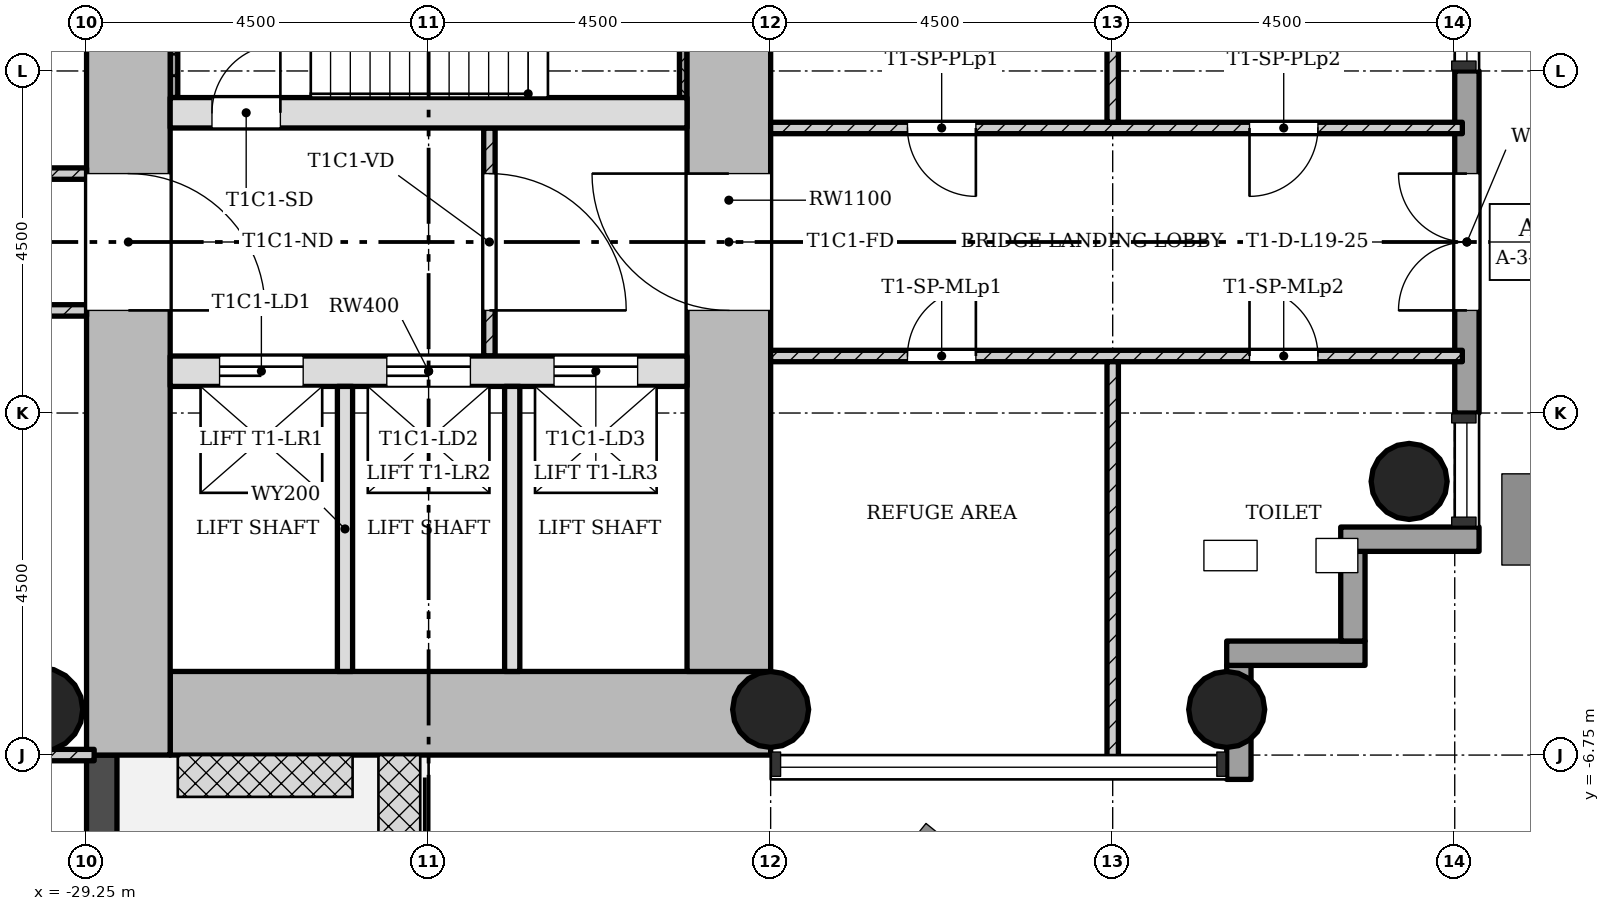
"""IFC4 building model, lengths in metres.
Left out: names, types, materials, properties, quantities, classifications, styles, units other than length and angle.
Written with IfcOpenShell. Run it as: python <this file> out.ifc"""

import sys

from ifc_helpers import new_model, si_unit, direction, frame, frame_2d, origin, origin_2d, place, context, subcontext, project, spatial, rectangle, hollow_circle, extrude, element, fill, save


model = new_model("IFC4")
c1 = context("Model", 3, precision=1e-05, world=origin(), true_north=direction((0.0, 1.0)))
c2 = subcontext(c1, "Body", "Model", "MODEL_VIEW")
j1 = project(units=[si_unit("LENGTHUNIT", "METRE"), si_unit("PLANEANGLEUNIT", "RADIAN")], contexts=[c1])
p1 = place(None, origin())
s1 = spatial("IfcSite", under=j1, at=p1, CompositionType="ELEMENT")
p2 = place(p1, origin())
s2 = spatial("IfcBuilding", under=s1, at=p2, CompositionType="ELEMENT")
p3 = place(p2, frame((0.0, 0.0, 72.1)))
s3 = spatial("IfcBuildingStorey", under=s2, at=p3, CompositionType="ELEMENT", Elevation=72.1)
p4 = place(p3, frame((-28.15, -6.2, 0.0), z_axis=(0.0, 0.0, 1.0), x_axis=(1.0, 0.0, 0.0)))
e1 = element("IfcWall", 1, at=p4, inside=s3, PredefinedType="SHEAR", context=c2, shape_type="SweptSolid", body=[
    extrude(rectangle(XDim=7.9, YDim=1.1, at=frame_2d((3.95, 0.0))), origin(), (0.0, 0.0, 1.0), 4.5),
])
p5 = place(p3, frame((-20.8, -5.65, 0.0), z_axis=(0.0, 0.0, 1.0), x_axis=(0.0, 1.0, 0.0)))
e2 = element("IfcWall", 2, at=p5, inside=s3, PredefinedType="SHEAR", context=c2, shape_type="SweptSolid", body=[
    extrude(rectangle(XDim=12.4, YDim=1.1, at=frame_2d((6.2, 0.0))), origin(), (0.0, 0.0, 1.0), 4.5),
])
p6 = place(p5, frame((4.75, 0.0, 0.0)))
e3 = element("IfcOpeningElement", 3, at=p6, cuts=e2, PredefinedType="OPENING", context=c2, shape_type="SweptSolid", body=[
    extrude(rectangle(XDim=1.8, YDim=2.1, at=frame_2d((0.9, 1.05))), frame((0.0, 0.56, 0.0), z_axis=(0.0, -1.0, 0.0), x_axis=(1.0, 0.0, 0.0)), (0.0, 0.0, 1.0), 1.12),
])
p7 = place(p3, frame((-28.7, 5.65, 0.0), z_axis=(0.0, 0.0, 1.0), x_axis=(0.0, -1.0, 0.0)))
e4 = element("IfcWall", 4, at=p7, inside=s3, PredefinedType="SHEAR", context=c2, shape_type="SweptSolid", body=[
    extrude(rectangle(XDim=12.4, YDim=1.1, at=frame_2d((6.2, 0.0))), origin(), (0.0, 0.0, 1.0), 4.5),
])
p8 = place(p7, frame((4.75, 0.0, 0.0)))
e5 = element("IfcOpeningElement", 5, at=p8, cuts=e4, PredefinedType="OPENING", context=c2, shape_type="SweptSolid", body=[
    extrude(rectangle(XDim=1.8, YDim=2.1, at=frame_2d((0.9, 1.05))), frame((0.0, 0.56, 0.0), z_axis=(0.0, -1.0, 0.0), x_axis=(1.0, 0.0, 0.0)), (0.0, 0.0, 1.0), 1.12),
])
p9 = place(p3, frame((-28.15, -1.7, 0.0), z_axis=(0.0, 0.0, 1.0), x_axis=(1.0, 0.0, 0.0)))
e6 = element("IfcWall", 6, at=p9, inside=s3, PredefinedType="SHEAR", context=c2, shape_type="SweptSolid", body=[
    extrude(rectangle(XDim=6.8, YDim=0.4, at=frame_2d((3.4, 0.0))), origin(), (0.0, 0.0, 1.0), 4.5),
])
p10 = place(p9, frame((0.65, 0.0, 0.0)))
e7 = element("IfcOpeningElement", 7, at=p10, cuts=e6, PredefinedType="OPENING", context=c2, shape_type="SweptSolid", body=[
    extrude(rectangle(XDim=1.1, YDim=2.1, at=frame_2d((0.55, 1.05))), frame((0.0, 0.21, 0.0), z_axis=(0.0, -1.0, 0.0), x_axis=(1.0, 0.0, 0.0)), (0.0, 0.0, 1.0), 0.42),
])
p11 = place(p9, frame((2.85, 0.0, 0.0)))
e8 = element("IfcOpeningElement", 8, at=p11, cuts=e6, PredefinedType="OPENING", context=c2, shape_type="SweptSolid", body=[
    extrude(rectangle(XDim=1.1, YDim=2.1, at=frame_2d((0.55, 1.05))), frame((0.0, 0.21, 0.0), z_axis=(0.0, -1.0, 0.0), x_axis=(1.0, 0.0, 0.0)), (0.0, 0.0, 1.0), 0.42),
])
p12 = place(p9, frame((5.05, 0.0, 0.0)))
e9 = element("IfcOpeningElement", 9, at=p12, cuts=e6, PredefinedType="OPENING", context=c2, shape_type="SweptSolid", body=[
    extrude(rectangle(XDim=1.1, YDim=2.1, at=frame_2d((0.55, 1.05))), frame((0.0, 0.21, 0.0), z_axis=(0.0, -1.0, 0.0), x_axis=(1.0, 0.0, 0.0)), (0.0, 0.0, 1.0), 0.42),
])
p13 = place(p3, frame((-28.15, 1.7, 0.0), z_axis=(0.0, 0.0, 1.0), x_axis=(1.0, 0.0, 0.0)))
e10 = element("IfcWall", 10, at=p13, inside=s3, PredefinedType="SHEAR", context=c2, shape_type="SweptSolid", body=[
    extrude(rectangle(XDim=6.8, YDim=0.4, at=frame_2d((3.4, 0.0))), origin(), (0.0, 0.0, 1.0), 4.5),
])
p14 = place(p13, frame((0.55, 0.0, 0.0)))
e11 = element("IfcOpeningElement", 11, at=p14, cuts=e10, PredefinedType="OPENING", context=c2, shape_type="SweptSolid", body=[
    extrude(rectangle(XDim=0.9, YDim=2.1, at=frame_2d((0.45, 1.05))), frame((0.0, 0.21, 0.0), z_axis=(0.0, -1.0, 0.0), x_axis=(1.0, 0.0, 0.0)), (0.0, 0.0, 1.0), 0.42),
])
for number, where, z_axis, x_axis in (
    (12, (-20.25, -6.15, 0.0), (0.0, 0.0, 1.0), (1.0, 0.0, 0.0)),
    (13, (-14.25, -6.15, 0.0), (0.0, 0.0, 1.0), (1.0, 0.0, 0.0)),
    (14, (-11.85, -3.15, 0.0), (0.0, 0.0, 1.0), (1.0, 0.0, 0.0)),
):
    element("IfcColumn", number, at=place(p3, frame(where, z_axis=z_axis, x_axis=x_axis)), inside=s3, PredefinedType="COLUMN", context=c2, shape_type="SweptSolid", body=[
        extrude(hollow_circle(Radius=0.5, WallThickness=0.036, at=origin_2d()), origin(), (0.0, 0.0, 1.0), 4.5),
    ])
p15 = place(p3, frame((-29.85, -6.15, 0.0), z_axis=(0.0, 0.0, 1.0), x_axis=(1.0, 0.0, 0.0)))
e15 = element("IfcColumn", 15, at=p15, inside=s3, PredefinedType="COLUMN", context=c2, shape_type="SweptSolid", body=[
    extrude(hollow_circle(Radius=0.55, WallThickness=0.04, at=origin_2d()), origin(), (0.0, 0.0, 1.0), 4.5),
])
p16 = place(p3, frame((-29.05, -11.25, -0.02), z_axis=(0.0, 0.0, 1.0), x_axis=(0.0, 1.0, 0.0)))
e16 = element("IfcWall", 16, at=p16, inside=s3, PredefinedType="STANDARD", context=c2, shape_type="SweptSolid", body=[
    extrude(rectangle(XDim=4.5, YDim=0.4, at=frame_2d((2.25, 0.0))), origin(), (0.0, 0.0, 1.0), 4.22),
])
p17 = place(p16, frame((1.35, 0.0, 0.02)))
e17 = element("IfcOpeningElement", 17, at=p17, cuts=e16, PredefinedType="OPENING", context=c2, shape_type="SweptSolid", body=[
    extrude(rectangle(XDim=1.8, YDim=2.1, at=frame_2d((0.9, 1.05))), frame((0.0, 0.21, 0.0), z_axis=(0.0, -1.0, 0.0), x_axis=(1.0, 0.0, 0.0)), (0.0, 0.0, 1.0), 0.42),
])
p18 = place(p3, frame((-14.09, -7.07, -0.3), z_axis=(0.0, 0.0, 1.0), x_axis=(0.0, 1.0, 0.0)))
e18 = element("IfcWall", 18, at=p18, inside=s3, PredefinedType="STANDARD", context=c2, shape_type="SweptSolid", body=[
    extrude(rectangle(XDim=1.5, YDim=0.32, at=frame_2d((0.75, 0.0))), origin(), (0.0, 0.0, 1.0), 4.5),
])
p19 = place(p3, frame((-14.25, -5.41, -0.3), z_axis=(0.0, 0.0, 1.0), x_axis=(1.0, 0.0, 0.0)))
e19 = element("IfcWall", 19, at=p19, inside=s3, PredefinedType="STANDARD", context=c2, shape_type="SweptSolid", body=[
    extrude(rectangle(XDim=1.82, YDim=0.32, at=frame_2d((0.91, 0.0))), origin(), (0.0, 0.0, 1.0), 4.5),
])
p20 = place(p3, frame((-12.59, -5.25, -0.3), z_axis=(0.0, 0.0, 1.0), x_axis=(0.0, 1.0, 0.0)))
e20 = element("IfcWall", 20, at=p20, inside=s3, PredefinedType="STANDARD", context=c2, shape_type="SweptSolid", body=[
    extrude(rectangle(XDim=1.18, YDim=0.32, at=frame_2d((0.59, 0.0))), origin(), (0.0, 0.0, 1.0), 4.5),
])
p21 = place(p3, frame((-12.75, -3.91, -0.3), z_axis=(0.0, 0.0, 1.0), x_axis=(1.0, 0.0, 0.0)))
e21 = element("IfcWall", 21, at=p21, inside=s3, PredefinedType="STANDARD", context=c2, shape_type="SweptSolid", body=[
    extrude(rectangle(XDim=1.82, YDim=0.32, at=frame_2d((0.91, 0.0))), origin(), (0.0, 0.0, 1.0), 4.5),
])
p22 = place(p3, frame((-11.09, -2.25, -0.12), z_axis=(0.0, 0.0, 1.0), x_axis=(0.0, 1.0, 0.0)))
e22 = element("IfcWall", 22, at=p22, inside=s3, PredefinedType="STANDARD", context=c2, shape_type="SweptSolid", body=[
    extrude(rectangle(XDim=4.5, YDim=0.32, at=frame_2d((2.25, 0.0))), origin(), (0.0, 0.0, 1.0), 4.32),
])
p23 = place(p22, frame((1.35, 0.0, 0.0)))
e23 = element("IfcOpeningElement", 23, at=p23, cuts=e22, PredefinedType="OPENING", context=c2, shape_type="SweptSolid", body=[
    extrude(rectangle(XDim=1.8, YDim=2.1, at=frame_2d((0.9, 1.05))), frame((0.0, 0.17, 0.0), z_axis=(0.0, -1.0, 0.0), x_axis=(1.0, 0.0, 0.0)), (0.0, 0.0, 1.0), 0.34),
])
p24 = place(p3, frame((-23.95, -1.5, 0.0), z_axis=(0.0, 0.0, 1.0), x_axis=(0.0, 1.0, 0.0)))
e24 = element("IfcWall", 24, at=p24, inside=s3, PredefinedType="PARTITIONING", context=c2, shape_type="SweptSolid", body=[
    extrude(rectangle(XDim=3.0, YDim=0.15, at=frame_2d((1.5, 0.0))), origin(), (0.0, 0.0, 1.0), 4.08),
])
p25 = place(p24, frame((0.6, 0.0, 0.0)))
e25 = element("IfcOpeningElement", 25, at=p25, cuts=e24, PredefinedType="OPENING", context=c2, shape_type="SweptSolid", body=[
    extrude(rectangle(XDim=1.8, YDim=2.1, at=frame_2d((0.9, 1.05))), frame((0.0, 0.085, 0.0), z_axis=(0.0, -1.0, 0.0), x_axis=(1.0, 0.0, 0.0)), (0.0, 0.0, 1.0), 0.17),
])
for number, where, z_axis, x_axis in (
    (26, (-25.85, -5.65, 0.0), (0.0, 0.0, 1.0), (0.0, 1.0, 0.0)),
    (27, (-23.65, -5.65, 0.0), (0.0, 0.0, 1.0), (0.0, 1.0, 0.0)),
):
    element("IfcWall", number, at=place(p3, frame(where, z_axis=z_axis, x_axis=x_axis)), inside=s3, PredefinedType="SOLIDWALL", context=c2, shape_type="SweptSolid", body=[
        extrude(rectangle(XDim=3.75, YDim=0.2, at=frame_2d((1.875, 0.0))), origin(), (0.0, 0.0, 1.0), 4.08),
    ])
p26 = place(p3, frame((-35.1, 0.9, 0.0), z_axis=(0.0, 0.0, 1.0), x_axis=(1.0, 0.0, 0.0)))
e28 = element("IfcWall", 28, at=p26, inside=s3, PredefinedType="PARTITIONING", context=c2, shape_type="SweptSolid", body=[
    extrude(rectangle(XDim=5.85, YDim=0.15, at=frame_2d((2.925, 0.0))), origin(), (0.0, 0.0, 1.0), 4.08),
])
p27 = place(p26, frame((2.475, 0.0, 0.0)))
e29 = element("IfcOpeningElement", 29, at=p27, cuts=e28, PredefinedType="OPENING", context=c2, shape_type="SweptSolid", body=[
    extrude(rectangle(XDim=0.9, YDim=2.1, at=frame_2d((0.45, 1.05))), frame((0.0, 0.085, 0.0), z_axis=(0.0, -1.0, 0.0), x_axis=(1.0, 0.0, 0.0)), (0.0, 0.0, 1.0), 0.17),
])
p28 = place(p3, frame((-35.1, -0.9, 0.0), z_axis=(0.0, 0.0, 1.0), x_axis=(1.0, 0.0, 0.0)))
e30 = element("IfcWall", 30, at=p28, inside=s3, PredefinedType="PARTITIONING", context=c2, shape_type="SweptSolid", body=[
    extrude(rectangle(XDim=5.85, YDim=0.15, at=frame_2d((2.925, 0.0))), origin(), (0.0, 0.0, 1.0), 4.08),
])
p29 = place(p28, frame((2.475, 0.0, 0.0)))
e31 = element("IfcOpeningElement", 31, at=p29, cuts=e30, PredefinedType="OPENING", context=c2, shape_type="SweptSolid", body=[
    extrude(rectangle(XDim=0.9, YDim=2.1, at=frame_2d((0.45, 1.05))), frame((0.0, 0.085, 0.0), z_axis=(0.0, -1.0, 0.0), x_axis=(1.0, 0.0, 0.0)), (0.0, 0.0, 1.0), 0.17),
])
p30 = place(p3, frame((-20.25, 1.5, 0.0), z_axis=(0.0, 0.0, 1.0), x_axis=(1.0, 0.0, 0.0)))
e32 = element("IfcWall", 32, at=p30, inside=s3, PredefinedType="PARTITIONING", context=c2, shape_type="SweptSolid", body=[
    extrude(rectangle(XDim=9.1, YDim=0.15, at=frame_2d((4.55, 0.0))), origin(), (0.0, 0.0, 1.0), 4.08),
])
p31 = place(p30, frame((1.8, 0.0, 0.0)))
e33 = element("IfcOpeningElement", 33, at=p31, cuts=e32, PredefinedType="OPENING", context=c2, shape_type="SweptSolid", body=[
    extrude(rectangle(XDim=0.9, YDim=2.1, at=frame_2d((0.45, 1.05))), frame((0.0, 0.085, 0.0), z_axis=(0.0, -1.0, 0.0), x_axis=(1.0, 0.0, 0.0)), (0.0, 0.0, 1.0), 0.17),
])
p32 = place(p30, frame((6.3, 0.0, 0.0)))
e34 = element("IfcOpeningElement", 34, at=p32, cuts=e32, PredefinedType="OPENING", context=c2, shape_type="SweptSolid", body=[
    extrude(rectangle(XDim=0.9, YDim=2.1, at=frame_2d((0.45, 1.05))), frame((0.0, 0.085, 0.0), z_axis=(0.0, -1.0, 0.0), x_axis=(1.0, 0.0, 0.0)), (0.0, 0.0, 1.0), 0.17),
])
p33 = place(p3, frame((-15.75, 1.575, 0.0), z_axis=(0.0, 0.0, 1.0), x_axis=(0.0, 1.0, 0.0)))
e35 = element("IfcWall", 35, at=p33, inside=s3, PredefinedType="PARTITIONING", context=c2, shape_type="SweptSolid", body=[
    extrude(rectangle(XDim=5.275, YDim=0.15, at=frame_2d((2.638, 0.0))), origin(), (0.0, 0.0, 1.0), 4.08),
])
p34 = place(p3, frame((-20.25, -1.5, 0.0), z_axis=(0.0, 0.0, 1.0), x_axis=(1.0, 0.0, 0.0)))
e36 = element("IfcWall", 36, at=p34, inside=s3, PredefinedType="PARTITIONING", context=c2, shape_type="SweptSolid", body=[
    extrude(rectangle(XDim=9.1, YDim=0.15, at=frame_2d((4.55, 0.0))), origin(), (0.0, 0.0, 1.0), 4.08),
])
p35 = place(p34, frame((1.8, 0.0, 0.0)))
e37 = element("IfcOpeningElement", 37, at=p35, cuts=e36, PredefinedType="OPENING", context=c2, shape_type="SweptSolid", body=[
    extrude(rectangle(XDim=0.9, YDim=2.1, at=frame_2d((0.45, 1.05))), frame((0.0, 0.085, 0.0), z_axis=(0.0, -1.0, 0.0), x_axis=(1.0, 0.0, 0.0)), (0.0, 0.0, 1.0), 0.17),
])
p36 = place(p34, frame((6.3, 0.0, 0.0)))
e38 = element("IfcOpeningElement", 38, at=p36, cuts=e36, PredefinedType="OPENING", context=c2, shape_type="SweptSolid", body=[
    extrude(rectangle(XDim=0.9, YDim=2.1, at=frame_2d((0.45, 1.05))), frame((0.0, 0.085, 0.0), z_axis=(0.0, -1.0, 0.0), x_axis=(1.0, 0.0, 0.0)), (0.0, 0.0, 1.0), 0.17),
])
p37 = place(p3, frame((-15.75, -1.575, 0.0), z_axis=(0.0, 0.0, 1.0), x_axis=(0.0, -1.0, 0.0)))
e39 = element("IfcWall", 39, at=p37, inside=s3, PredefinedType="PARTITIONING", context=c2, shape_type="SweptSolid", body=[
    extrude(rectangle(XDim=5.275, YDim=0.15, at=frame_2d((2.638, 0.0))), origin(), (0.0, 0.0, 1.0), 4.08),
])
p38 = place(p3, frame((-42.85, -6.75, 0.0), z_axis=(0.0, 0.0, 1.0), x_axis=(1.0, 0.0, 0.0)))
e40 = element("IfcWall", 40, at=p38, inside=s3, PredefinedType="PARTITIONING", context=c2, shape_type="SweptSolid", body=[
    extrude(rectangle(XDim=13.7, YDim=0.15, at=frame_2d((6.85, 0.0))), origin(), (0.0, 0.0, 1.0), 4.08),
])
p39 = place(p38, frame((5.95, 0.0, 0.0)))
e41 = element("IfcOpeningElement", 41, at=p39, cuts=e40, PredefinedType="OPENING", context=c2, shape_type="SweptSolid", body=[
    extrude(rectangle(XDim=1.8, YDim=2.1, at=frame_2d((0.9, 1.05))), frame((0.0, 0.085, 0.0), z_axis=(0.0, -1.0, 0.0), x_axis=(1.0, 0.0, 0.0)), (0.0, 0.0, 1.0), 0.17),
])
for number, where, z_axis, x_axis in (
    (42, (-21.4, 1.9, 0.0), (0.0, 0.0, 1.0), (0.0, 1.0, 0.0)),
    (43, (-28.1, 1.9, 0.0), (0.0, 0.0, 1.0), (0.0, 1.0, 0.0)),
):
    element("IfcWall", number, at=place(p3, frame(where, z_axis=z_axis, x_axis=x_axis)), inside=s3, PredefinedType="SHEAR", context=c2, shape_type="SweptSolid", body=[
        extrude(rectangle(XDim=3.75, YDim=0.1, at=frame_2d((1.875, 0.0))), origin(), (0.0, 0.0, 1.0), 4.5),
    ])
p40 = place(p23, origin())
e44 = element("IfcDoor", 44, at=p40, inside=s3, OperationType="DOUBLE_DOOR_SINGLE_SWING", PredefinedType="DOOR", context=c2, shape_type="SweptSolid", body=[
    extrude(rectangle(XDim=1.8, YDim=2.1, at=frame_2d((0.9, 1.05))), frame((0.0, 0.025, 0.0), z_axis=(0.0, -1.0, 0.0), x_axis=(1.0, 0.0, 0.0)), (0.0, 0.0, 1.0), 0.05),
])
fill(e23, e44)
p41 = place(p25, origin())
e45 = element("IfcDoor", 45, at=p41, inside=s3, OperationType="SINGLE_SWING_LEFT", PredefinedType="DOOR", context=c2, shape_type="SweptSolid", body=[
    extrude(rectangle(XDim=1.8, YDim=2.1, at=frame_2d((0.9, 1.05))), frame((0.0, 0.025, 0.0), z_axis=(0.0, -1.0, 0.0), x_axis=(1.0, 0.0, 0.0)), (0.0, 0.0, 1.0), 0.05),
])
fill(e25, e45)
p42 = place(p31, origin())
e46 = element("IfcDoor", 46, at=p42, inside=s3, OperationType="SINGLE_SWING_RIGHT", PredefinedType="DOOR", context=c2, shape_type="SweptSolid", body=[
    extrude(rectangle(XDim=0.9, YDim=2.1, at=frame_2d((0.45, 1.05))), frame((0.0, 0.025, 0.0), z_axis=(0.0, -1.0, 0.0), x_axis=(1.0, 0.0, 0.0)), (0.0, 0.0, 1.0), 0.05),
])
fill(e33, e46)
p43 = place(p32, origin())
e47 = element("IfcDoor", 47, at=p43, inside=s3, OperationType="SINGLE_SWING_LEFT", PredefinedType="DOOR", context=c2, shape_type="SweptSolid", body=[
    extrude(rectangle(XDim=0.9, YDim=2.1, at=frame_2d((0.45, 1.05))), frame((0.0, 0.025, 0.0), z_axis=(0.0, -1.0, 0.0), x_axis=(1.0, 0.0, 0.0)), (0.0, 0.0, 1.0), 0.05),
])
fill(e34, e47)
p44 = place(p35, origin())
e48 = element("IfcDoor", 48, at=p44, inside=s3, OperationType="SINGLE_SWING_LEFT", PredefinedType="DOOR", context=c2, shape_type="SweptSolid", body=[
    extrude(rectangle(XDim=0.9, YDim=2.1, at=frame_2d((0.45, 1.05))), frame((0.0, 0.025, 0.0), z_axis=(0.0, -1.0, 0.0), x_axis=(1.0, 0.0, 0.0)), (0.0, 0.0, 1.0), 0.05),
])
fill(e37, e48)
p45 = place(p36, origin())
e49 = element("IfcDoor", 49, at=p45, inside=s3, OperationType="SINGLE_SWING_RIGHT", PredefinedType="DOOR", context=c2, shape_type="SweptSolid", body=[
    extrude(rectangle(XDim=0.9, YDim=2.1, at=frame_2d((0.45, 1.05))), frame((0.0, 0.025, 0.0), z_axis=(0.0, -1.0, 0.0), x_axis=(1.0, 0.0, 0.0)), (0.0, 0.0, 1.0), 0.05),
])
fill(e38, e49)
p46 = place(p14, origin())
e50 = element("IfcDoor", 50, at=p46, inside=s3, OperationType="SINGLE_SWING_LEFT", PredefinedType="DOOR", context=c2, shape_type="SweptSolid", body=[
    extrude(rectangle(XDim=0.9, YDim=2.1, at=frame_2d((0.45, 1.05))), frame((0.0, 0.025, 0.0), z_axis=(0.0, -1.0, 0.0), x_axis=(1.0, 0.0, 0.0)), (0.0, 0.0, 1.0), 0.05),
])
fill(e11, e50)
p47 = place(p10, origin())
e51 = element("IfcDoor", 51, at=p47, inside=s3, OperationType="SLIDING_TO_LEFT", PredefinedType="DOOR", context=c2, shape_type="SweptSolid", body=[
    extrude(rectangle(XDim=1.1, YDim=2.1, at=frame_2d((0.55, 1.05))), frame((0.0, 0.025, 0.0), z_axis=(0.0, -1.0, 0.0), x_axis=(1.0, 0.0, 0.0)), (0.0, 0.0, 1.0), 0.05),
])
fill(e7, e51)
p48 = place(p11, origin())
e52 = element("IfcDoor", 52, at=p48, inside=s3, OperationType="SLIDING_TO_LEFT", PredefinedType="DOOR", context=c2, shape_type="SweptSolid", body=[
    extrude(rectangle(XDim=1.1, YDim=2.1, at=frame_2d((0.55, 1.05))), frame((0.0, 0.025, 0.0), z_axis=(0.0, -1.0, 0.0), x_axis=(1.0, 0.0, 0.0)), (0.0, 0.0, 1.0), 0.05),
])
fill(e8, e52)
p49 = place(p12, origin())
e53 = element("IfcDoor", 53, at=p49, inside=s3, OperationType="SLIDING_TO_LEFT", PredefinedType="DOOR", context=c2, shape_type="SweptSolid", body=[
    extrude(rectangle(XDim=1.1, YDim=2.1, at=frame_2d((0.55, 1.05))), frame((0.0, 0.025, 0.0), z_axis=(0.0, -1.0, 0.0), x_axis=(1.0, 0.0, 0.0)), (0.0, 0.0, 1.0), 0.05),
])
fill(e9, e53)
p50 = place(p8, origin())
e54 = element("IfcDoor", 54, at=p50, inside=s3, OperationType="SINGLE_SWING_LEFT", PredefinedType="DOOR", context=c2, shape_type="SweptSolid", body=[
    extrude(rectangle(XDim=1.8, YDim=2.1, at=frame_2d((0.9, 1.05))), frame((0.0, 0.025, 0.0), z_axis=(0.0, -1.0, 0.0), x_axis=(1.0, 0.0, 0.0)), (0.0, 0.0, 1.0), 0.05),
])
fill(e5, e54)
p51 = place(p6, origin())
e55 = element("IfcDoor", 55, at=p51, inside=s3, OperationType="SINGLE_SWING_LEFT", PredefinedType="DOOR", context=c2, shape_type="SweptSolid", body=[
    extrude(rectangle(XDim=1.8, YDim=2.1, at=frame_2d((0.9, 1.05))), frame((0.0, 0.025, 0.0), z_axis=(0.0, -1.0, 0.0), x_axis=(1.0, 0.0, 0.0)), (0.0, 0.0, 1.0), 0.05),
])
fill(e3, e55)
save(model, sys.argv[1])
